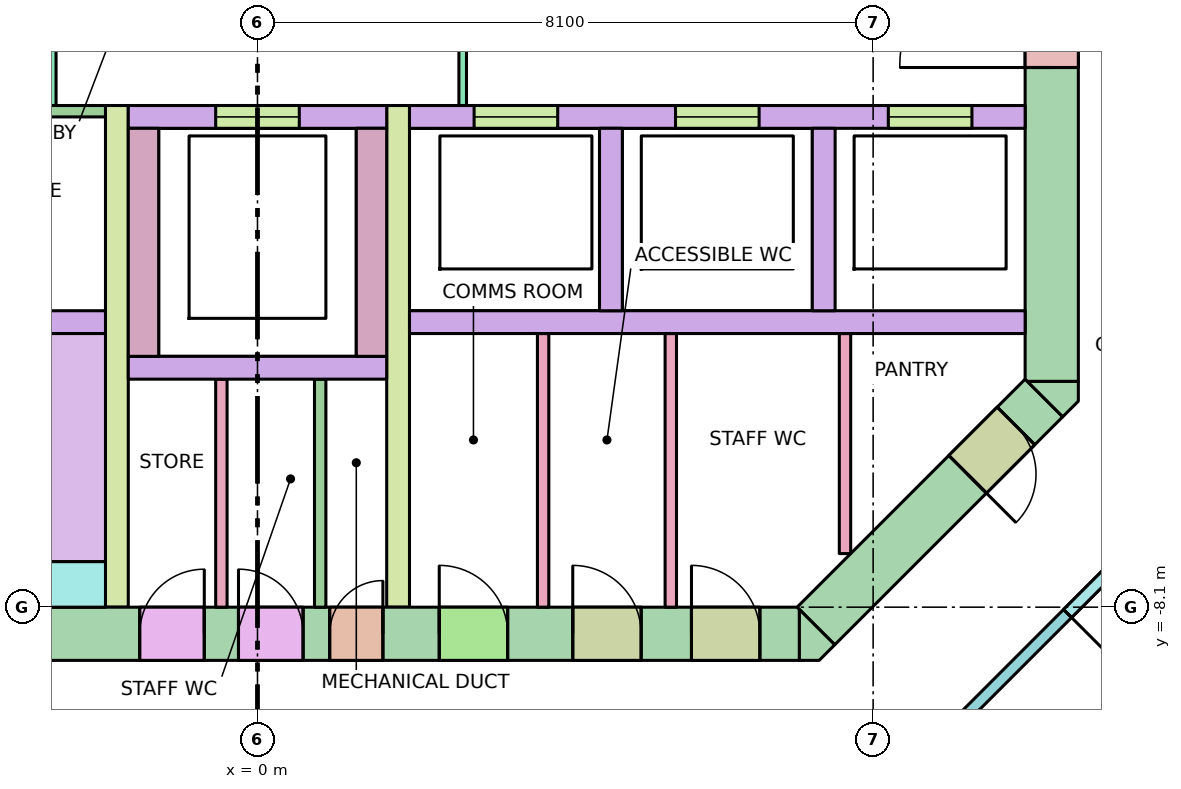
"""IFC4 building model, lengths in metres.
Left out: names, types, materials, properties, quantities, classifications, styles, units other than length and angle.
Written with IfcOpenShell. Run it as: python <this file> out.ifc"""

import sys

from ifc_helpers import new_model, si_unit, direction, frame, frame_2d, origin, place, context, subcontext, project, spatial, polyline, rectangle, outline, extrude, element, fill, save


model = new_model("IFC4")
c1 = context("Model", 3, precision=1e-05, world=origin(), true_north=direction((0.0, 1.0)))
c2 = subcontext(c1, "Body", "Model", "MODEL_VIEW")
j1 = project(units=[si_unit("LENGTHUNIT", "METRE"), si_unit("PLANEANGLEUNIT", "RADIAN")], contexts=[c1])
p1 = place(None, origin())
s1 = spatial("IfcSite", under=j1, at=p1, CompositionType="ELEMENT")
p2 = place(p1, origin())
s2 = spatial("IfcBuilding", under=s1, at=p2, CompositionType="ELEMENT")
p3 = place(p2, frame((0.0, 0.0, 211.3)))
s3 = spatial("IfcBuildingStorey", under=s2, at=p3, CompositionType="ELEMENT", Elevation=211.3)
p4 = place(p3, frame((-7.13, -8.45, -0.28), z_axis=(0.0, 0.0, 1.0), x_axis=(1.0, 0.0, 0.0)))
e1 = element("IfcWall", 1, at=p4, inside=s3, PredefinedType="SHEAR", context=c2, shape_type="SweptSolid", body=[
    extrude(rectangle(XDim=14.26, YDim=0.7, at=frame_2d((7.13, 0.0))), origin(), (0.0, 0.0, 1.0), 3.7),
])
p5 = place(p4, frame((8.08, 0.0, 0.28)))
e2 = element("IfcOpeningElement", 2, at=p5, cuts=e1, PredefinedType="OPENING", context=c2, shape_type="SweptSolid", body=[
    extrude(rectangle(XDim=0.7, YDim=2.1, at=frame_2d((0.35, 1.05))), frame((0.0, 0.36, 0.0), z_axis=(0.0, -1.0, 0.0), x_axis=(1.0, 0.0, 0.0)), (0.0, 0.0, 1.0), 0.72),
])
p6 = place(p4, frame((5.58, 0.0, 0.28)))
e3 = element("IfcOpeningElement", 3, at=p6, cuts=e1, PredefinedType="OPENING", context=c2, shape_type="SweptSolid", body=[
    extrude(rectangle(XDim=0.85, YDim=2.1, at=frame_2d((0.425, 1.05))), frame((0.0, 0.36, 0.0), z_axis=(0.0, -1.0, 0.0), x_axis=(1.0, 0.0, 0.0)), (0.0, 0.0, 1.0), 0.72),
])
p7 = place(p4, frame((6.88, 0.0, 0.28)))
e4 = element("IfcOpeningElement", 4, at=p7, cuts=e1, PredefinedType="OPENING", context=c2, shape_type="SweptSolid", body=[
    extrude(rectangle(XDim=0.85, YDim=2.1, at=frame_2d((0.425, 1.05))), frame((0.0, 0.36, 0.0), z_axis=(0.0, -1.0, 0.0), x_axis=(1.0, 0.0, 0.0)), (0.0, 0.0, 1.0), 0.72),
])
p8 = place(p4, frame((9.521, 0.0, 0.28)))
e5 = element("IfcOpeningElement", 5, at=p8, cuts=e1, PredefinedType="OPENING", context=c2, shape_type="SweptSolid", body=[
    extrude(rectangle(XDim=0.9, YDim=2.1, at=frame_2d((0.45, 1.05))), frame((0.0, 0.36, 0.0), z_axis=(0.0, -1.0, 0.0), x_axis=(1.0, 0.0, 0.0)), (0.0, 0.0, 1.0), 0.72),
])
p9 = place(p4, frame((11.278, 0.0, 0.28)))
e6 = element("IfcOpeningElement", 6, at=p9, cuts=e1, PredefinedType="OPENING", context=c2, shape_type="SweptSolid", body=[
    extrude(rectangle(XDim=0.9, YDim=2.1, at=frame_2d((0.45, 1.05))), frame((0.0, 0.36, 0.0), z_axis=(0.0, -1.0, 0.0), x_axis=(1.0, 0.0, 0.0)), (0.0, 0.0, 1.0), 0.72),
])
p10 = place(p4, frame((12.84, 0.0, 0.28)))
e7 = element("IfcOpeningElement", 7, at=p10, cuts=e1, PredefinedType="OPENING", context=c2, shape_type="SweptSolid", body=[
    extrude(rectangle(XDim=0.9, YDim=2.1, at=frame_2d((0.45, 1.05))), frame((0.0, 0.36, 0.0), z_axis=(0.0, -1.0, 0.0), x_axis=(1.0, 0.0, 0.0)), (0.0, 0.0, 1.0), 0.72),
])
p11 = place(p3, frame((10.45, -5.13, -0.28), z_axis=(0.0, 0.0, 1.0), x_axis=(0.0, 1.0, 0.0)))
e8 = element("IfcWall", 8, at=p11, inside=s3, PredefinedType="SHEAR", context=c2, shape_type="SweptSolid", body=[
    extrude(rectangle(XDim=10.26, YDim=0.7, at=frame_2d((5.13, 0.0))), origin(), (0.0, 0.0, 1.0), 3.7),
])
p12 = place(p11, frame((4.13, 0.0, 0.28)))
e9 = element("IfcOpeningElement", 9, at=p12, cuts=e8, PredefinedType="OPENING", context=c2, shape_type="SweptSolid", body=[
    extrude(rectangle(XDim=2.0, YDim=2.1, at=frame_2d((1.0, 1.05))), frame((0.0, 0.36, 0.0), z_axis=(0.0, -1.0, 0.0), x_axis=(1.0, 0.0, 0.0)), (0.0, 0.0, 1.0), 0.72),
])
p13 = place(p3, frame((10.347, -5.347, -0.28), z_axis=(0.0, 0.0, 1.0), x_axis=(-0.707106781187, -0.707106781187, 0.0)))
e10 = element("IfcWall", 10, at=p13, inside=s3, PredefinedType="SHEAR", context=c2, shape_type="SweptSolid", body=[
    extrude(rectangle(XDim=4.243, YDim=0.7, at=frame_2d((2.121, 0.0))), origin(), (0.0, 0.0, 1.0), 3.7),
])
p14 = place(p13, frame((0.52, 0.0, 0.28)))
e11 = element("IfcOpeningElement", 11, at=p14, cuts=e10, PredefinedType="OPENING", context=c2, shape_type="SweptSolid", body=[
    extrude(rectangle(XDim=0.9, YDim=2.1, at=frame_2d((0.45, 1.05))), frame((0.0, 0.36, 0.0), z_axis=(0.0, -1.0, 0.0), x_axis=(1.0, 0.0, 0.0)), (0.0, 0.0, 1.0), 0.72),
])
p15 = place(p3, frame((0.0, 0.0, -0.28)))
e12 = element("IfcWall", 12, at=p15, inside=s3, PredefinedType="SHEAR", context=c2, shape_type="SweptSolid", body=[
    extrude(outline(polyline([(7.39, -8.8), (7.13, -8.8), (7.13, -8.8), (7.13, -8.13), (7.595, -8.595), (7.595, -8.595), (7.595, -8.595), (7.39, -8.8)])), origin(), (0.0, 0.0, 1.0), 3.7),
])
p16 = place(p3, frame((0.0, 0.0, -0.28)))
e13 = element("IfcWall", 13, at=p16, inside=s3, PredefinedType="SHEAR", context=c2, shape_type="SweptSolid", body=[
    extrude(outline(polyline([(10.8, -5.39), (10.595, -5.595), (10.595, -5.595), (10.595, -5.595), (10.13, -5.13), (10.8, -5.13), (10.8, -5.13), (10.8, -5.39)])), origin(), (0.0, 0.0, 1.0), 3.7),
])
for number, where, z_axis, x_axis in (
    (14, (-10.1, -4.35, 0.0), (0.0, 0.0, 1.0), (1.0, 0.0, 0.0)),
    (15, (2.0, -4.35, 0.0), (0.0, 0.0, 1.0), (1.0, 0.0, 0.0)),
):
    element("IfcWall", number, at=place(p3, frame(where, z_axis=z_axis, x_axis=x_axis)), inside=s3, PredefinedType="SOLIDWALL", context=c2, shape_type="SweptSolid", body=[
        extrude(rectangle(XDim=8.1, YDim=0.3, at=frame_2d((4.05, 0.0))), origin(), (0.0, 0.0, 1.0), 3.42),
    ])
p17 = place(p3, frame((2.0, -1.65, 0.0), z_axis=(0.0, 0.0, 1.0), x_axis=(1.0, 0.0, 0.0)))
e16 = element("IfcWall", 16, at=p17, inside=s3, PredefinedType="SOLIDWALL", context=c2, shape_type="SweptSolid", body=[
    extrude(rectangle(XDim=8.1, YDim=0.3, at=frame_2d((4.05, 0.0))), origin(), (0.0, 0.0, 1.0), 3.42),
])
p18 = place(p17, frame((0.85, 0.0, 0.0)))
e17 = element("IfcOpeningElement", 17, at=p18, cuts=e16, PredefinedType="OPENING", context=c2, shape_type="SweptSolid", body=[
    extrude(rectangle(XDim=1.1, YDim=2.1, at=frame_2d((0.55, 1.05))), frame((0.0, 0.16, 0.0), z_axis=(0.0, -1.0, 0.0), x_axis=(1.0, 0.0, 0.0)), (0.0, 0.0, 1.0), 0.32),
])
p19 = place(p17, frame((3.5, 0.0, 0.0)))
e18 = element("IfcOpeningElement", 18, at=p19, cuts=e16, PredefinedType="OPENING", context=c2, shape_type="SweptSolid", body=[
    extrude(rectangle(XDim=1.1, YDim=2.1, at=frame_2d((0.55, 1.05))), frame((0.0, 0.16, 0.0), z_axis=(0.0, -1.0, 0.0), x_axis=(1.0, 0.0, 0.0)), (0.0, 0.0, 1.0), 0.32),
])
p20 = place(p17, frame((6.3, 0.0, 0.0)))
e19 = element("IfcOpeningElement", 19, at=p20, cuts=e16, PredefinedType="OPENING", context=c2, shape_type="SweptSolid", body=[
    extrude(rectangle(XDim=1.1, YDim=2.1, at=frame_2d((0.55, 1.05))), frame((0.0, 0.16, 0.0), z_axis=(0.0, -1.0, 0.0), x_axis=(1.0, 0.0, 0.0)), (0.0, 0.0, 1.0), 0.32),
])
for number, where, z_axis, x_axis in (
    (20, (4.65, -4.2, 0.0), (0.0, 0.0, 1.0), (0.0, 1.0, 0.0)),
    (21, (7.45, -4.2, 0.0), (0.0, 0.0, 1.0), (0.0, 1.0, 0.0)),
):
    element("IfcWall", number, at=place(p3, frame(where, z_axis=z_axis, x_axis=x_axis)), inside=s3, PredefinedType="SOLIDWALL", context=c2, shape_type="SweptSolid", body=[
        extrude(rectangle(XDim=2.4, YDim=0.3, at=frame_2d((1.2, 0.0))), origin(), (0.0, 0.0, 1.0), 3.42),
    ])
for number, where, z_axis, x_axis in (
    (22, (-1.85, -8.1, 0.0), (0.0, 0.0, 1.0), (0.0, 1.0, 0.0)),
    (23, (1.85, -8.1, 0.0), (0.0, 0.0, 1.0), (0.0, 1.0, 0.0)),
):
    element("IfcWall", number, at=place(p3, frame(where, z_axis=z_axis, x_axis=x_axis)), inside=s3, PredefinedType="SHEAR", context=c2, shape_type="SweptSolid", body=[
        extrude(rectangle(XDim=6.6, YDim=0.3, at=frame_2d((3.3, 0.0))), origin(), (0.0, 0.0, 1.0), 3.42),
    ])
p21 = place(p3, frame((-1.7, -1.65, 0.0), z_axis=(0.0, 0.0, 1.0), x_axis=(1.0, 0.0, 0.0)))
e24 = element("IfcWall", 24, at=p21, inside=s3, PredefinedType="SOLIDWALL", context=c2, shape_type="SweptSolid", body=[
    extrude(rectangle(XDim=3.4, YDim=0.3, at=frame_2d((1.7, 0.0))), origin(), (0.0, 0.0, 1.0), 3.42),
])
p22 = place(p21, frame((1.15, 0.0, 0.0)))
e25 = element("IfcOpeningElement", 25, at=p22, cuts=e24, PredefinedType="OPENING", context=c2, shape_type="SweptSolid", body=[
    extrude(rectangle(XDim=1.1, YDim=2.1, at=frame_2d((0.55, 1.05))), frame((0.0, 0.16, 0.0), z_axis=(0.0, -1.0, 0.0), x_axis=(1.0, 0.0, 0.0)), (0.0, 0.0, 1.0), 0.32),
])
for number, where, z_axis, x_axis in (
    (26, (-1.5, -4.8, 0.0), (0.0, 0.0, 1.0), (0.0, 1.0, 0.0)),
    (27, (1.5, -4.8, 0.0), (0.0, 0.0, 1.0), (0.0, 1.0, 0.0)),
):
    element("IfcWall", number, at=place(p3, frame(where, z_axis=z_axis, x_axis=x_axis)), inside=s3, PredefinedType="SOLIDWALL", context=c2, shape_type="SweptSolid", body=[
        extrude(rectangle(XDim=3.0, YDim=0.4, at=frame_2d((1.5, 0.0))), origin(), (0.0, 0.0, 1.0), 3.42),
    ])
p23 = place(p3, frame((-1.7, -4.95, 0.0), z_axis=(0.0, 0.0, 1.0), x_axis=(1.0, 0.0, 0.0)))
e28 = element("IfcWall", 28, at=p23, inside=s3, PredefinedType="SOLIDWALL", context=c2, shape_type="SweptSolid", body=[
    extrude(rectangle(XDim=3.4, YDim=0.3, at=frame_2d((1.7, 0.0))), origin(), (0.0, 0.0, 1.0), 3.42),
])
p24 = place(p3, frame((-7.37, -7.8, 0.0), z_axis=(0.0, 0.0, 1.0), x_axis=(1.0, 0.0, 0.0)))
e29 = element("IfcWall", 29, at=p24, inside=s3, PredefinedType="SHEAR", context=c2, shape_type="SweptSolid", body=[
    extrude(rectangle(XDim=5.37, YDim=0.6, at=frame_2d((2.685, 0.0))), origin(), (0.0, 0.0, 1.0), 3.42),
])
p25 = place(p3, frame((-2.7, -1.5, 0.0), z_axis=(0.0, 0.0, 1.0), x_axis=(0.0, 1.0, 0.0)))
e30 = element("IfcWall", 30, at=p25, inside=s3, PredefinedType="PARTITIONING", context=c2, shape_type="SweptSolid", body=[
    extrude(rectangle(XDim=3.0, YDim=0.1, at=frame_2d((1.5, 0.0))), origin(), (0.0, 0.0, 1.0), 3.42),
])
p26 = place(p25, frame((0.9, 0.0, 0.0)))
e31 = element("IfcOpeningElement", 31, at=p26, cuts=e30, PredefinedType="OPENING", context=c2, shape_type="SweptSolid", body=[
    extrude(rectangle(XDim=1.2, YDim=2.1, at=frame_2d((0.6, 1.05))), frame((0.0, 0.06, 0.0), z_axis=(0.0, -1.0, 0.0), x_axis=(1.0, 0.0, 0.0)), (0.0, 0.0, 1.0), 0.12),
])
p27 = place(p3, frame((2.7, -1.5, 0.0), z_axis=(0.0, 0.0, 1.0), x_axis=(0.0, 1.0, 0.0)))
e32 = element("IfcWall", 32, at=p27, inside=s3, PredefinedType="PARTITIONING", context=c2, shape_type="SweptSolid", body=[
    extrude(rectangle(XDim=3.0, YDim=0.1, at=frame_2d((1.5, 0.0))), origin(), (0.0, 0.0, 1.0), 3.42),
])
p28 = place(p27, frame((0.9, 0.0, 0.0)))
e33 = element("IfcOpeningElement", 33, at=p28, cuts=e32, PredefinedType="OPENING", context=c2, shape_type="SweptSolid", body=[
    extrude(rectangle(XDim=1.2, YDim=2.1, at=frame_2d((0.6, 1.05))), frame((0.0, 0.06, 0.0), z_axis=(0.0, -1.0, 0.0), x_axis=(1.0, 0.0, 0.0)), (0.0, 0.0, 1.0), 0.12),
])
for number, where, z_axis, x_axis in (
    (34, (0.825, -8.1, 0.0), (0.0, 0.0, 1.0), (0.0, 1.0, 0.0)),
    (35, (-0.475, -8.1, 0.0), (0.0, 0.0, 1.0), (0.0, 1.0, 0.0)),
):
    element("IfcWall", number, at=place(p3, frame(where, z_axis=z_axis, x_axis=x_axis)), inside=s3, PredefinedType="PARTITIONING", context=c2, shape_type="SweptSolid", body=[
        extrude(rectangle(XDim=3.0, YDim=0.15, at=frame_2d((1.5, 0.0))), origin(), (0.0, 0.0, 1.0), 3.42),
    ])
for number, where, z_axis, x_axis in (
    (36, (3.758, -8.1, 0.0), (0.0, 0.0, 1.0), (0.0, 1.0, 0.0)),
    (37, (5.438, -8.1, 0.0), (0.0, 0.0, 1.0), (0.0, 1.0, 0.0)),
):
    element("IfcWall", number, at=place(p3, frame(where, z_axis=z_axis, x_axis=x_axis)), inside=s3, PredefinedType="PARTITIONING", context=c2, shape_type="SweptSolid", body=[
        extrude(rectangle(XDim=3.6, YDim=0.15, at=frame_2d((1.8, 0.0))), origin(), (0.0, 0.0, 1.0), 3.42),
    ])
p29 = place(p3, frame((7.73, -7.395, 0.0), z_axis=(0.0, 0.0, 1.0), x_axis=(0.0, 1.0, 0.0)))
e38 = element("IfcWall", 38, at=p29, inside=s3, PredefinedType="PARTITIONING", context=c2, shape_type="SweptSolid", body=[
    extrude(rectangle(XDim=2.895, YDim=0.15, at=frame_2d((1.448, 0.0))), origin(), (0.0, 0.0, 1.0), 3.42),
])
p30 = place(p3, frame((-10.1, -1.575, 0.0), z_axis=(0.0, 0.0, 1.0), x_axis=(1.0, 0.0, 0.0)))
e39 = element("IfcWall", 39, at=p30, inside=s3, PredefinedType="PARTITIONING", context=c2, shape_type="SweptSolid", body=[
    extrude(rectangle(XDim=8.1, YDim=0.15, at=frame_2d((4.05, 0.0))), origin(), (0.0, 0.0, 1.0), 3.42),
])
p31 = place(p30, frame((0.33, 0.0, 0.0)))
e40 = element("IfcOpeningElement", 40, at=p31, cuts=e39, PredefinedType="OPENING", context=c2, shape_type="SweptSolid", body=[
    extrude(rectangle(XDim=0.9, YDim=2.1, at=frame_2d((0.45, 1.05))), frame((0.0, 0.085, 0.0), z_axis=(0.0, -1.0, 0.0), x_axis=(1.0, 0.0, 0.0)), (0.0, 0.0, 1.0), 0.17),
])
p32 = place(p30, frame((2.04, 0.0, 0.0)))
e41 = element("IfcOpeningElement", 41, at=p32, cuts=e39, PredefinedType="OPENING", context=c2, shape_type="SweptSolid", body=[
    extrude(rectangle(XDim=0.9, YDim=2.1, at=frame_2d((0.45, 1.05))), frame((0.0, 0.085, 0.0), z_axis=(0.0, -1.0, 0.0), x_axis=(1.0, 0.0, 0.0)), (0.0, 0.0, 1.0), 0.17),
])
p33 = place(p30, frame((5.31, 0.0, 0.0)))
e42 = element("IfcOpeningElement", 42, at=p33, cuts=e39, PredefinedType="OPENING", context=c2, shape_type="SweptSolid", body=[
    extrude(rectangle(XDim=0.9, YDim=2.1, at=frame_2d((0.45, 1.05))), frame((0.0, 0.085, 0.0), z_axis=(0.0, -1.0, 0.0), x_axis=(1.0, 0.0, 0.0)), (0.0, 0.0, 1.0), 0.17),
])
p34 = place(p3, frame((12.638, -6.204, 0.0), z_axis=(0.0, 0.0, 1.0), x_axis=(-0.707106781187, -0.707106781187, 0.0)))
e43 = element("IfcWall", 43, at=p34, inside=s3, PredefinedType="PARTITIONING", context=c2, shape_type="SweptSolid", body=[
    extrude(rectangle(XDim=6.271, YDim=0.15, at=frame_2d((3.135, 0.0))), origin(), (0.0, 0.0, 1.0), 2.62),
])
p35 = place(p34, frame((4.935, 0.0, 0.0)))
e44 = element("IfcOpeningElement", 44, at=p35, cuts=e43, PredefinedType="OPENING", context=c2, shape_type="SweptSolid", body=[
    extrude(rectangle(XDim=0.9, YDim=2.1, at=frame_2d((0.45, 1.05))), frame((0.0, 0.085, 0.0), z_axis=(0.0, -1.0, 0.0), x_axis=(1.0, 0.0, 0.0)), (0.0, 0.0, 1.0), 0.17),
])
p36 = place(p34, frame((1.8, 0.0, 0.0)))
e45 = element("IfcOpeningElement", 45, at=p36, cuts=e43, PredefinedType="OPENING", context=c2, shape_type="SweptSolid", body=[
    extrude(rectangle(XDim=1.0, YDim=2.1, at=frame_2d((0.5, 1.05))), frame((0.0, 0.085, 0.0), z_axis=(0.0, -1.0, 0.0), x_axis=(1.0, 0.0, 0.0)), (0.0, 0.0, 1.0), 0.17),
])
p37 = place(p3, frame((9.474, -9.474, 0.0), z_axis=(0.0, 0.0, 1.0), x_axis=(0.707106781187, -0.707106781187, 0.0)))
e46 = element("IfcWall", 46, at=p37, inside=s3, PredefinedType="PARTITIONING", context=c2, shape_type="SweptSolid", body=[
    extrude(rectangle(XDim=5.938, YDim=0.1, at=frame_2d((2.969, 0.0))), origin(), (0.0, 0.0, 1.0), 2.62),
])
p38 = place(p18, origin())
e47 = element("IfcDoor", 47, at=p38, inside=s3, OperationType="DOUBLE_DOOR_SLIDING", PredefinedType="DOOR", context=c2, shape_type="SweptSolid", body=[
    extrude(rectangle(XDim=1.1, YDim=2.1, at=frame_2d((0.55, 1.05))), frame((0.0, 0.025, 0.0), z_axis=(0.0, -1.0, 0.0), x_axis=(1.0, 0.0, 0.0)), (0.0, 0.0, 1.0), 0.05),
])
fill(e17, e47)
p39 = place(p19, origin())
e48 = element("IfcDoor", 48, at=p39, inside=s3, OperationType="DOUBLE_DOOR_SLIDING", PredefinedType="DOOR", context=c2, shape_type="SweptSolid", body=[
    extrude(rectangle(XDim=1.1, YDim=2.1, at=frame_2d((0.55, 1.05))), frame((0.0, 0.025, 0.0), z_axis=(0.0, -1.0, 0.0), x_axis=(1.0, 0.0, 0.0)), (0.0, 0.0, 1.0), 0.05),
])
fill(e18, e48)
p40 = place(p20, origin())
e49 = element("IfcDoor", 49, at=p40, inside=s3, OperationType="DOUBLE_DOOR_SLIDING", PredefinedType="DOOR", context=c2, shape_type="SweptSolid", body=[
    extrude(rectangle(XDim=1.1, YDim=2.1, at=frame_2d((0.55, 1.05))), frame((0.0, 0.025, 0.0), z_axis=(0.0, -1.0, 0.0), x_axis=(1.0, 0.0, 0.0)), (0.0, 0.0, 1.0), 0.05),
])
fill(e19, e49)
p41 = place(p22, origin())
e50 = element("IfcDoor", 50, at=p41, inside=s3, OperationType="DOUBLE_DOOR_SLIDING", PredefinedType="DOOR", context=c2, shape_type="SweptSolid", body=[
    extrude(rectangle(XDim=1.1, YDim=2.1, at=frame_2d((0.55, 1.05))), frame((0.0, 0.025, 0.0), z_axis=(0.0, -1.0, 0.0), x_axis=(1.0, 0.0, 0.0)), (0.0, 0.0, 1.0), 0.05),
])
fill(e25, e50)
p42 = place(p12, origin())
e51 = element("IfcDoor", 51, at=p42, inside=s3, OperationType="DOUBLE_DOOR_SINGLE_SWING", PredefinedType="DOOR", context=c2, shape_type="SweptSolid", body=[
    extrude(rectangle(XDim=2.0, YDim=2.1, at=frame_2d((1.0, 1.05))), frame((0.0, 0.025, 0.0), z_axis=(0.0, -1.0, 0.0), x_axis=(1.0, 0.0, 0.0)), (0.0, 0.0, 1.0), 0.05),
])
fill(e9, e51)
p43 = place(p5, origin())
e52 = element("IfcDoor", 52, at=p43, inside=s3, OperationType="SINGLE_SWING_RIGHT", PredefinedType="DOOR", context=c2, shape_type="SweptSolid", body=[
    extrude(rectangle(XDim=0.7, YDim=2.1, at=frame_2d((0.35, 1.05))), frame((0.0, 0.025, 0.0), z_axis=(0.0, -1.0, 0.0), x_axis=(1.0, 0.0, 0.0)), (0.0, 0.0, 1.0), 0.05),
])
fill(e2, e52)
p44 = place(p6, origin())
e53 = element("IfcDoor", 53, at=p44, inside=s3, OperationType="SINGLE_SWING_RIGHT", PredefinedType="DOOR", context=c2, shape_type="SweptSolid", body=[
    extrude(rectangle(XDim=0.85, YDim=2.1, at=frame_2d((0.425, 1.05))), frame((0.0, 0.025, 0.0), z_axis=(0.0, -1.0, 0.0), x_axis=(1.0, 0.0, 0.0)), (0.0, 0.0, 1.0), 0.05),
])
fill(e3, e53)
p45 = place(p7, origin())
e54 = element("IfcDoor", 54, at=p45, inside=s3, OperationType="SINGLE_SWING_LEFT", PredefinedType="DOOR", context=c2, shape_type="SweptSolid", body=[
    extrude(rectangle(XDim=0.85, YDim=2.1, at=frame_2d((0.425, 1.05))), frame((0.0, 0.025, 0.0), z_axis=(0.0, -1.0, 0.0), x_axis=(1.0, 0.0, 0.0)), (0.0, 0.0, 1.0), 0.05),
])
fill(e4, e54)
p46 = place(p8, origin())
e55 = element("IfcDoor", 55, at=p46, inside=s3, OperationType="SINGLE_SWING_LEFT", PredefinedType="DOOR", context=c2, shape_type="SweptSolid", body=[
    extrude(rectangle(XDim=0.9, YDim=2.1, at=frame_2d((0.45, 1.05))), frame((0.0, 0.025, 0.0), z_axis=(0.0, -1.0, 0.0), x_axis=(1.0, 0.0, 0.0)), (0.0, 0.0, 1.0), 0.05),
])
fill(e5, e55)
p47 = place(p9, origin())
e56 = element("IfcDoor", 56, at=p47, inside=s3, OperationType="SINGLE_SWING_LEFT", PredefinedType="DOOR", context=c2, shape_type="SweptSolid", body=[
    extrude(rectangle(XDim=0.9, YDim=2.1, at=frame_2d((0.45, 1.05))), frame((0.0, 0.025, 0.0), z_axis=(0.0, -1.0, 0.0), x_axis=(1.0, 0.0, 0.0)), (0.0, 0.0, 1.0), 0.05),
])
fill(e6, e56)
p48 = place(p10, origin())
e57 = element("IfcDoor", 57, at=p48, inside=s3, OperationType="SINGLE_SWING_LEFT", PredefinedType="DOOR", context=c2, shape_type="SweptSolid", body=[
    extrude(rectangle(XDim=0.9, YDim=2.1, at=frame_2d((0.45, 1.05))), frame((0.0, 0.025, 0.0), z_axis=(0.0, -1.0, 0.0), x_axis=(1.0, 0.0, 0.0)), (0.0, 0.0, 1.0), 0.05),
])
fill(e7, e57)
p49 = place(p14, origin())
e58 = element("IfcDoor", 58, at=p49, inside=s3, OperationType="SINGLE_SWING_RIGHT", PredefinedType="DOOR", context=c2, shape_type="SweptSolid", body=[
    extrude(rectangle(XDim=0.9, YDim=2.1, at=frame_2d((0.45, 1.05))), frame((0.0, 0.025, 0.0), z_axis=(0.0, -1.0, 0.0), x_axis=(1.0, 0.0, 0.0)), (0.0, 0.0, 1.0), 0.05),
])
fill(e11, e58)
p50 = place(p36, origin())
e59 = element("IfcDoor", 59, at=p50, inside=s3, OperationType="SINGLE_SWING_RIGHT", PredefinedType="DOOR", context=c2, shape_type="SweptSolid", body=[
    extrude(rectangle(XDim=1.0, YDim=2.1, at=frame_2d((0.5, 1.05))), frame((0.0, 0.025, 0.0), z_axis=(0.0, -1.0, 0.0), x_axis=(1.0, 0.0, 0.0)), (0.0, 0.0, 1.0), 0.05),
])
fill(e45, e59)
save(model, sys.argv[1])
